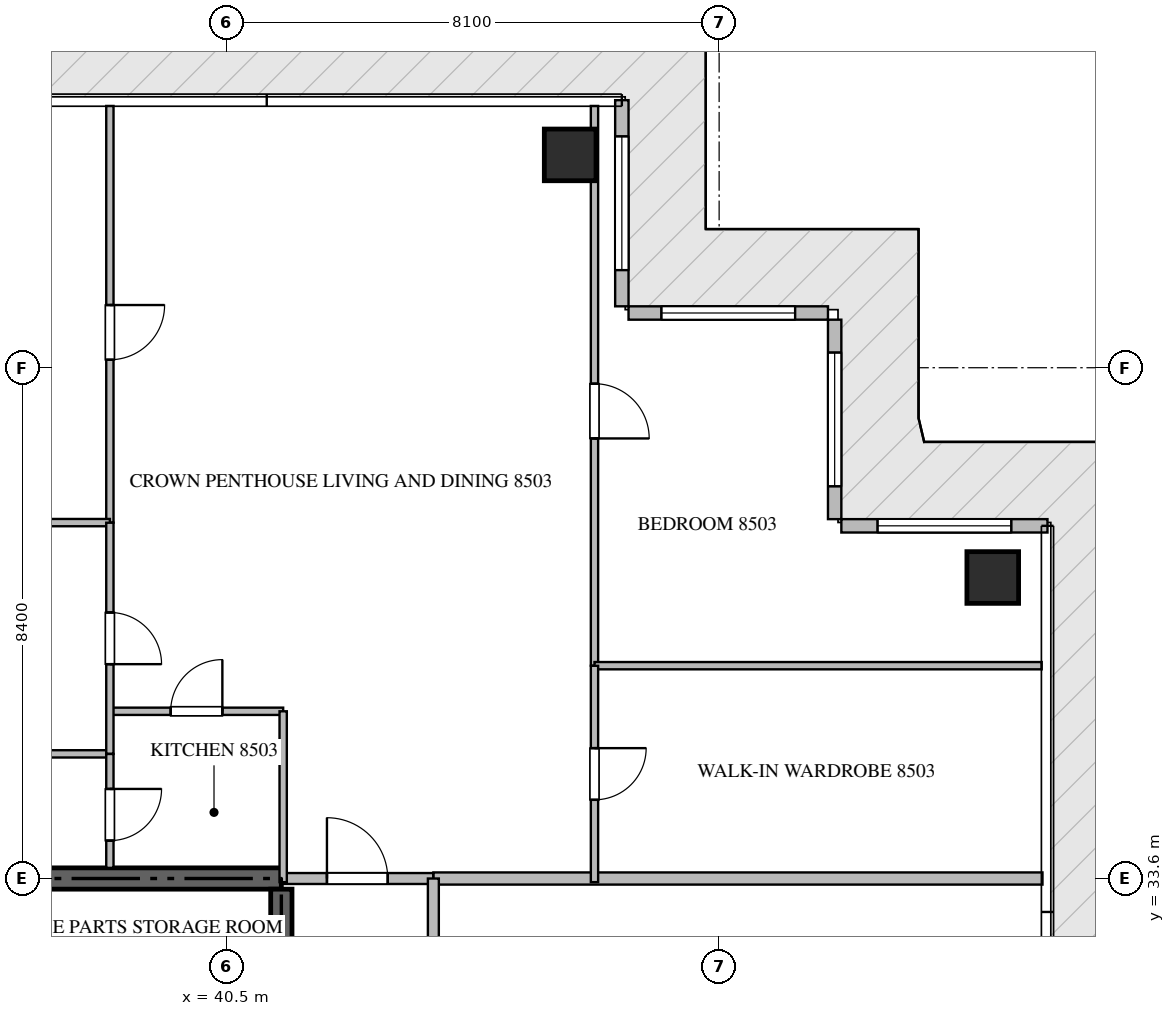
"""IFC4 building model, lengths in metres.
Left out: names, types, materials, properties, quantities, classifications, styles, units other than length and angle.
Written with IfcOpenShell. Run it as: python <this file> out.ifc"""

import sys

from ifc_helpers import new_model, si_unit, direction, frame, frame_2d, origin, origin_2d, place, context, subcontext, project, spatial, rectangle, extrude, source, transform, mapped, element, fill, save


model = new_model("IFC4")
c1 = context("Model", 3, precision=1e-05, world=origin(), true_north=direction((0.0, 1.0)))
c2 = subcontext(c1, "Body", "Model", "MODEL_VIEW")
j1 = project(units=[si_unit("LENGTHUNIT", "METRE"), si_unit("PLANEANGLEUNIT", "RADIAN")], contexts=[c1])
p1 = place(None, origin())
s1 = spatial("IfcSite", under=j1, at=p1, CompositionType="ELEMENT")
p2 = place(p1, origin())
s2 = spatial("IfcBuilding", under=s1, at=p2, CompositionType="ELEMENT")
p3 = place(p2, frame((0.0, 0.0, 342.05)))
s3 = spatial("IfcBuildingStorey", under=s2, at=p3, CompositionType="ELEMENT", Elevation=342.05)
p4 = place(p3, frame((41.4, 33.6, -0.26), z_axis=(0.0, 0.0, 1.0), x_axis=(-1.0, 0.0, 0.0)))
e1 = element("IfcWall", 1, at=p4, inside=s3, PredefinedType="SHEAR", context=c2, shape_type="SweptSolid", body=[
    extrude(rectangle(XDim=18.0, YDim=0.35, at=frame_2d((9.0, 0.0))), origin(), (0.0, 0.0, 1.0), 5.898),
])
p5 = place(p3, frame((41.4, 27.75, -0.26), z_axis=(0.0, 0.0, 1.0), x_axis=(0.0, 1.0, 0.0)))
e2 = element("IfcWall", 2, at=p5, inside=s3, PredefinedType="SHEAR", context=c2, shape_type="SweptSolid", body=[
    extrude(rectangle(XDim=5.675, YDim=0.35, at=frame_2d((2.837, 0.0))), origin(), (0.0, 0.0, 1.0), 5.898),
])
m1 = source(origin(), c2, "Body", "SweptSolid", [
    extrude(rectangle(XDim=0.85, YDim=0.85, at=origin_2d()), origin(), (0.0, 0.0, 1.0), 5.9),
])
for number, where, z_axis, x_axis in (
    (3, (46.15, 45.5, -0.26), (0.0, 0.0, 1.0), (1.0, 0.0, 0.0)),
    (4, (53.1, 38.55, -0.26), (0.0, 0.0, 1.0), (1.0, 0.0, 0.0)),
):
    element("IfcColumn", number, at=place(p3, frame(where, z_axis=z_axis, x_axis=x_axis)), inside=s3, PredefinedType="COLUMN", context=c2, shape_type="MappedRepresentation", body=[
        mapped(m1, transform((0.0, 0.0, 0.0), scale=1.0)),
    ])
p6 = place(p3, frame((54.0, 39.4, 0.0), z_axis=(0.0, 0.0, 1.0), x_axis=(-1.0, 0.0, 0.0)))
e5 = element("IfcWall", 5, at=p6, inside=s3, PredefinedType="ELEMENTEDWALL", context=c2, shape_type="SweptSolid", body=[
    extrude(rectangle(XDim=3.39, YDim=0.22, at=frame_2d((1.695, 0.0))), origin(), (0.0, 0.0, 1.0), 5.625),
])
p7 = place(p6, frame((0.595, 0.0, 0.65)))
e6 = element("IfcOpeningElement", 6, at=p7, cuts=e5, PredefinedType="OPENING", context=c2, shape_type="SweptSolid", body=[
    extrude(rectangle(XDim=2.2, YDim=2.4, at=frame_2d((1.1, 1.2))), frame((0.0, 0.12, 0.0), z_axis=(0.0, -1.0, 0.0), x_axis=(1.0, 0.0, 0.0)), (0.0, 0.0, 1.0), 0.24),
])
p8 = place(p3, frame((50.5, 39.51, 0.0), z_axis=(0.0, 0.0, 1.0), x_axis=(0.0, 1.0, 0.0)))
e7 = element("IfcWall", 7, at=p8, inside=s3, PredefinedType="ELEMENTEDWALL", context=c2, shape_type="SweptSolid", body=[
    extrude(rectangle(XDim=3.28, YDim=0.22, at=frame_2d((1.64, 0.0))), origin(), (0.0, 0.0, 1.0), 5.625),
])
p9 = place(p8, frame((0.54, 0.0, 0.65)))
e8 = element("IfcOpeningElement", 8, at=p9, cuts=e7, PredefinedType="OPENING", context=c2, shape_type="SweptSolid", body=[
    extrude(rectangle(XDim=2.2, YDim=2.4, at=frame_2d((1.1, 1.2))), frame((0.0, 0.12, 0.0), z_axis=(0.0, -1.0, 0.0), x_axis=(1.0, 0.0, 0.0)), (0.0, 0.0, 1.0), 0.24),
])
p10 = place(p3, frame((50.39, 42.9, 0.0), z_axis=(0.0, 0.0, 1.0), x_axis=(-1.0, 0.0, 0.0)))
e9 = element("IfcWall", 9, at=p10, inside=s3, PredefinedType="ELEMENTEDWALL", context=c2, shape_type="SweptSolid", body=[
    extrude(rectangle(XDim=3.28, YDim=0.22, at=frame_2d((1.64, 0.0))), origin(), (0.0, 0.0, 1.0), 5.625),
])
p11 = place(p10, frame((0.54, 0.0, 0.65)))
e10 = element("IfcOpeningElement", 10, at=p11, cuts=e9, PredefinedType="OPENING", context=c2, shape_type="SweptSolid", body=[
    extrude(rectangle(XDim=2.2, YDim=2.4, at=frame_2d((1.1, 1.2))), frame((0.0, 0.12, 0.0), z_axis=(0.0, -1.0, 0.0), x_axis=(1.0, 0.0, 0.0)), (0.0, 0.0, 1.0), 0.24),
])
p12 = place(p3, frame((47.0, 43.01, 0.0), z_axis=(0.0, 0.0, 1.0), x_axis=(0.0, 1.0, 0.0)))
e11 = element("IfcWall", 11, at=p12, inside=s3, PredefinedType="ELEMENTEDWALL", context=c2, shape_type="SweptSolid", body=[
    extrude(rectangle(XDim=3.39, YDim=0.22, at=frame_2d((1.695, 0.0))), origin(), (0.0, 0.0, 1.0), 5.625),
])
p13 = place(p12, frame((0.595, 0.0, 0.65)))
e12 = element("IfcOpeningElement", 12, at=p13, cuts=e11, PredefinedType="OPENING", context=c2, shape_type="SweptSolid", body=[
    extrude(rectangle(XDim=2.2, YDim=2.4, at=frame_2d((1.1, 1.2))), frame((0.0, 0.12, 0.0), z_axis=(0.0, -1.0, 0.0), x_axis=(1.0, 0.0, 0.0)), (0.0, 0.0, 1.0), 0.24),
])
p14 = place(p3, frame((43.9, 33.6, 0.0), z_axis=(0.0, 0.0, 1.0), x_axis=(1.0, 0.0, 0.0)))
e13 = element("IfcWall", 13, at=p14, inside=s3, PredefinedType="PARTITIONING", context=c2, shape_type="SweptSolid", body=[
    extrude(rectangle(XDim=10.018, YDim=0.2, at=frame_2d((5.009, 0.0))), origin(), (0.0, 0.0, 1.0), 5.64),
])
p15 = place(p3, frame((41.402, 33.6, 0.0), z_axis=(0.0, 0.0, 1.0), x_axis=(1.0, 0.0, 0.0)))
e14 = element("IfcWall", 14, at=p15, inside=s3, PredefinedType="PARTITIONING", context=c2, shape_type="SweptSolid", body=[
    extrude(rectangle(XDim=2.496, YDim=0.18, at=frame_2d((1.248, 0.0))), origin(), (0.0, 0.0, 1.0), 5.64),
])
p16 = place(p15, frame((0.748, 0.0, 0.0)))
e15 = element("IfcOpeningElement", 15, at=p16, cuts=e14, PredefinedType="OPENING", context=c2, shape_type="SweptSolid", body=[
    extrude(rectangle(XDim=1.0, YDim=2.15, at=frame_2d((0.5, 1.075))), frame((0.0, 0.1, 0.0), z_axis=(0.0, -1.0, 0.0), x_axis=(1.0, 0.0, 0.0)), (0.0, 0.0, 1.0), 0.2),
])
p17 = place(p3, frame((43.9, 16.8, 0.0), z_axis=(0.0, 0.0, 1.0), x_axis=(0.0, 1.0, 0.0)))
e16 = element("IfcWall", 16, at=p17, inside=s3, PredefinedType="PARTITIONING", context=c2, shape_type="SweptSolid", body=[
    extrude(rectangle(XDim=16.8, YDim=0.18, at=frame_2d((8.4, 0.0))), origin(), (0.0, 0.0, 1.0), 5.64),
])
p18 = place(p17, frame((14.5, 0.0, 0.0)))
e17 = element("IfcOpeningElement", 17, at=p18, cuts=e16, PredefinedType="OPENING", context=c2, shape_type="SweptSolid", body=[
    extrude(rectangle(XDim=1.0, YDim=2.15, at=frame_2d((0.5, 1.075))), frame((0.0, 0.1, 0.0), z_axis=(0.0, -1.0, 0.0), x_axis=(1.0, 0.0, 0.0)), (0.0, 0.0, 1.0), 0.2),
])
p19 = place(p3, frame((38.58, 36.35, 0.0), z_axis=(0.0, 0.0, 1.0), x_axis=(1.0, 0.0, 0.0)))
e18 = element("IfcWall", 18, at=p19, inside=s3, PredefinedType="PARTITIONING", context=c2, shape_type="SweptSolid", body=[
    extrude(rectangle(XDim=2.85, YDim=0.12, at=frame_2d((1.425, 0.0))), origin(), (0.0, 0.0, 1.0), 5.64),
])
p20 = place(p19, frame((1.0, 0.0, 0.0)))
e19 = element("IfcOpeningElement", 19, at=p20, cuts=e18, PredefinedType="OPENING", context=c2, shape_type="SweptSolid", body=[
    extrude(rectangle(XDim=0.85, YDim=2.1, at=frame_2d((0.425, 1.05))), frame((0.0, 0.07, 0.0), z_axis=(0.0, -1.0, 0.0), x_axis=(1.0, 0.0, 0.0)), (0.0, 0.0, 1.0), 0.14),
])
p21 = place(p3, frame((41.43, 36.35, 0.0), z_axis=(0.0, 0.0, 1.0), x_axis=(0.0, -1.0, 0.0)))
e20 = element("IfcWall", 20, at=p21, inside=s3, PredefinedType="PARTITIONING", context=c2, shape_type="SweptSolid", body=[
    extrude(rectangle(XDim=2.81, YDim=0.12, at=frame_2d((1.405, 0.0))), origin(), (0.0, 0.0, 1.0), 5.64),
])
p22 = place(p3, frame((38.58, 46.305, 0.0), z_axis=(0.0, 0.0, 1.0), x_axis=(0.0, -1.0, 0.0)))
e21 = element("IfcWall", 21, at=p22, inside=s3, PredefinedType="PARTITIONING", context=c2, shape_type="SweptSolid", body=[
    extrude(rectangle(XDim=6.852, YDim=0.12, at=frame_2d((3.426, 0.0))), origin(), (0.0, 0.0, 1.0), 5.64),
])
p23 = place(p22, frame((3.274, 0.0, 0.0)))
e22 = element("IfcOpeningElement", 22, at=p23, cuts=e21, PredefinedType="OPENING", context=c2, shape_type="SweptSolid", body=[
    extrude(rectangle(XDim=0.9, YDim=2.1, at=frame_2d((0.45, 1.05))), frame((0.0, 0.07, 0.0), z_axis=(0.0, -1.0, 0.0), x_axis=(1.0, 0.0, 0.0)), (0.0, 0.0, 1.0), 0.14),
])
p24 = place(p3, frame((32.34, 39.453, 0.0), z_axis=(0.0, 0.0, 1.0), x_axis=(1.0, 0.0, 0.0)))
e23 = element("IfcWall", 23, at=p24, inside=s3, PredefinedType="PARTITIONING", context=c2, shape_type="SweptSolid", body=[
    extrude(rectangle(XDim=6.24, YDim=0.12, at=frame_2d((3.12, 0.0))), origin(), (0.0, 0.0, 1.0), 5.64),
])
p25 = place(p3, frame((32.462, 35.65, 0.0), z_axis=(0.0, 0.0, 1.0), x_axis=(1.0, 0.0, 0.0)))
e24 = element("IfcWall", 24, at=p25, inside=s3, PredefinedType="PARTITIONING", context=c2, shape_type="SweptSolid", body=[
    extrude(rectangle(XDim=6.118, YDim=0.12, at=frame_2d((3.059, 0.0))), origin(), (0.0, 0.0, 1.0), 5.64),
])
p26 = place(p3, frame((38.58, 39.451, 0.0), z_axis=(0.0, 0.0, 1.0), x_axis=(0.0, -1.0, 0.0)))
e25 = element("IfcWall", 25, at=p26, inside=s3, PredefinedType="PARTITIONING", context=c2, shape_type="SweptSolid", body=[
    extrude(rectangle(XDim=3.801, YDim=0.12, at=frame_2d((1.9, 0.0))), origin(), (0.0, 0.0, 1.0), 5.64),
])
p27 = place(p26, frame((1.476, 0.0, 0.0)))
e26 = element("IfcOpeningElement", 26, at=p27, cuts=e25, PredefinedType="OPENING", context=c2, shape_type="SweptSolid", body=[
    extrude(rectangle(XDim=0.85, YDim=2.1, at=frame_2d((0.425, 1.05))), frame((0.0, 0.07, 0.0), z_axis=(0.0, -1.0, 0.0), x_axis=(1.0, 0.0, 0.0)), (0.0, 0.0, 1.0), 0.14),
])
p28 = place(p3, frame((38.58, 35.648, 0.0), z_axis=(0.0, 0.0, 1.0), x_axis=(0.0, -1.0, 0.0)))
e27 = element("IfcWall", 27, at=p28, inside=s3, PredefinedType="PARTITIONING", context=c2, shape_type="SweptSolid", body=[
    extrude(rectangle(XDim=1.873, YDim=0.12, at=frame_2d((0.937, 0.0))), origin(), (0.0, 0.0, 1.0), 5.64),
])
p29 = place(p28, frame((0.575, 0.0, 0.0)))
e28 = element("IfcOpeningElement", 28, at=p29, cuts=e27, PredefinedType="OPENING", context=c2, shape_type="SweptSolid", body=[
    extrude(rectangle(XDim=0.85, YDim=2.1, at=frame_2d((0.425, 1.05))), frame((0.0, 0.07, 0.0), z_axis=(0.0, -1.0, 0.0), x_axis=(1.0, 0.0, 0.0)), (0.0, 0.0, 1.0), 0.14),
])
p30 = place(p3, frame((46.55, 46.305, 0.0), z_axis=(0.0, 0.0, 1.0), x_axis=(0.0, -1.0, 0.0)))
e29 = element("IfcWall", 29, at=p30, inside=s3, PredefinedType="PARTITIONING", context=c2, shape_type="SweptSolid", body=[
    extrude(rectangle(XDim=9.205, YDim=0.12, at=frame_2d((4.603, 0.0))), origin(), (0.0, 0.0, 1.0), 5.64),
])
p31 = place(p30, frame((4.568, 0.0, 0.0)))
e30 = element("IfcOpeningElement", 30, at=p31, cuts=e29, PredefinedType="OPENING", context=c2, shape_type="SweptSolid", body=[
    extrude(rectangle(XDim=0.9, YDim=2.1, at=frame_2d((0.45, 1.05))), frame((0.0, 0.07, 0.0), z_axis=(0.0, -1.0, 0.0), x_axis=(1.0, 0.0, 0.0)), (0.0, 0.0, 1.0), 0.14),
])
p32 = place(p3, frame((46.55, 37.1, 0.0), z_axis=(0.0, 0.0, 1.0), x_axis=(1.0, 0.0, 0.0)))
e31 = element("IfcWall", 31, at=p32, inside=s3, PredefinedType="PARTITIONING", context=c2, shape_type="SweptSolid", body=[
    extrude(rectangle(XDim=7.355, YDim=0.12, at=frame_2d((3.677, 0.0))), origin(), (0.0, 0.0, 1.0), 5.64),
])
p33 = place(p3, frame((46.55, 37.098, 0.0), z_axis=(0.0, 0.0, 1.0), x_axis=(0.0, -1.0, 0.0)))
e32 = element("IfcWall", 32, at=p33, inside=s3, PredefinedType="PARTITIONING", context=c2, shape_type="SweptSolid", body=[
    extrude(rectangle(XDim=3.558, YDim=0.12, at=frame_2d((1.779, 0.0))), origin(), (0.0, 0.0, 1.0), 5.64),
])
p34 = place(p33, frame((1.354, 0.0, 0.0)))
e33 = element("IfcOpeningElement", 33, at=p34, cuts=e32, PredefinedType="OPENING", context=c2, shape_type="SweptSolid", body=[
    extrude(rectangle(XDim=0.85, YDim=2.1, at=frame_2d((0.425, 1.05))), frame((0.0, 0.07, 0.0), z_axis=(0.0, -1.0, 0.0), x_axis=(1.0, 0.0, 0.0)), (0.0, 0.0, 1.0), 0.14),
])
m2 = source(origin(), c2, "Body", "SweptSolid", [
    extrude(rectangle(XDim=2.2, YDim=2.4, at=frame_2d((1.1, 1.2))), frame((0.0, 0.03, 0.0), z_axis=(0.0, -1.0, 0.0), x_axis=(1.0, 0.0, 0.0)), (0.0, 0.0, 1.0), 0.06),
])
p35 = place(p7, origin())
e34 = element("IfcWindow", 34, at=p35, inside=s3, PartitioningType="SINGLE_PANEL", PredefinedType="WINDOW", context=c2, shape_type="MappedRepresentation", body=[
    mapped(m2, transform((0.0, 0.0, 0.0), scale=1.0)),
])
fill(e6, e34)
p36 = place(p9, origin())
e35 = element("IfcWindow", 35, at=p36, inside=s3, PartitioningType="SINGLE_PANEL", PredefinedType="WINDOW", context=c2, shape_type="MappedRepresentation", body=[
    mapped(m2, transform((0.0, 0.0, 0.0), scale=1.0)),
])
fill(e8, e35)
p37 = place(p11, origin())
e36 = element("IfcWindow", 36, at=p37, inside=s3, PartitioningType="SINGLE_PANEL", PredefinedType="WINDOW", context=c2, shape_type="MappedRepresentation", body=[
    mapped(m2, transform((0.0, 0.0, 0.0), scale=1.0)),
])
fill(e10, e36)
p38 = place(p13, origin())
e37 = element("IfcWindow", 37, at=p38, inside=s3, PartitioningType="SINGLE_PANEL", PredefinedType="WINDOW", context=c2, shape_type="MappedRepresentation", body=[
    mapped(m2, transform((0.0, 0.0, 0.0), scale=1.0)),
])
fill(e12, e37)
m3 = source(origin(), c2, "Body", "SweptSolid", [
    extrude(rectangle(XDim=1.0, YDim=2.15, at=frame_2d((0.5, 1.075))), frame((0.0, 0.025, 0.0), z_axis=(0.0, -1.0, 0.0), x_axis=(1.0, 0.0, 0.0)), (0.0, 0.0, 1.0), 0.05),
])
p39 = place(p16, origin())
e38 = element("IfcDoor", 38, at=p39, inside=s3, OperationType="SINGLE_SWING_LEFT", PredefinedType="DOOR", context=c2, shape_type="MappedRepresentation", body=[
    mapped(m3, transform((0.0, 0.0, 0.0), scale=1.0)),
])
fill(e15, e38)
m4 = source(origin(), c2, "Body", "SweptSolid", [
    extrude(rectangle(XDim=0.85, YDim=2.1, at=frame_2d((0.425, 1.05))), frame((0.0, 0.025, 0.0), z_axis=(0.0, -1.0, 0.0), x_axis=(1.0, 0.0, 0.0)), (0.0, 0.0, 1.0), 0.05),
])
p40 = place(p20, origin())
e39 = element("IfcDoor", 39, at=p40, inside=s3, OperationType="SINGLE_SWING_RIGHT", PredefinedType="DOOR", context=c2, shape_type="MappedRepresentation", body=[
    mapped(m4, transform((0.0, 0.0, 0.0), scale=1.0)),
])
fill(e19, e39)
m5 = source(origin(), c2, "Body", "SweptSolid", [
    extrude(rectangle(XDim=0.9, YDim=2.1, at=frame_2d((0.45, 1.05))), frame((0.0, 0.025, 0.0), z_axis=(0.0, -1.0, 0.0), x_axis=(1.0, 0.0, 0.0)), (0.0, 0.0, 1.0), 0.05),
])
p41 = place(p23, origin())
e40 = element("IfcDoor", 40, at=p41, inside=s3, OperationType="SINGLE_SWING_LEFT", PredefinedType="DOOR", context=c2, shape_type="MappedRepresentation", body=[
    mapped(m5, transform((0.0, 0.0, 0.0), scale=1.0)),
])
fill(e22, e40)
p42 = place(p27, origin())
e41 = element("IfcDoor", 41, at=p42, inside=s3, OperationType="SINGLE_SWING_RIGHT", PredefinedType="DOOR", context=c2, shape_type="MappedRepresentation", body=[
    mapped(m4, transform((0.0, 0.0, 0.0), scale=1.0)),
])
fill(e26, e41)
p43 = place(p29, origin())
e42 = element("IfcDoor", 42, at=p43, inside=s3, OperationType="SINGLE_SWING_LEFT", PredefinedType="DOOR", context=c2, shape_type="MappedRepresentation", body=[
    mapped(m4, transform((0.0, 0.0, 0.0), scale=1.0)),
])
fill(e28, e42)
p44 = place(p31, origin())
e43 = element("IfcDoor", 43, at=p44, inside=s3, OperationType="SINGLE_SWING_RIGHT", PredefinedType="DOOR", context=c2, shape_type="MappedRepresentation", body=[
    mapped(m5, transform((0.0, 0.0, 0.0), scale=1.0)),
])
fill(e30, e43)
p45 = place(p34, origin())
e44 = element("IfcDoor", 44, at=p45, inside=s3, OperationType="SINGLE_SWING_LEFT", PredefinedType="DOOR", context=c2, shape_type="MappedRepresentation", body=[
    mapped(m4, transform((0.0, 0.0, 0.0), scale=1.0)),
])
fill(e33, e44)
save(model, sys.argv[1])
